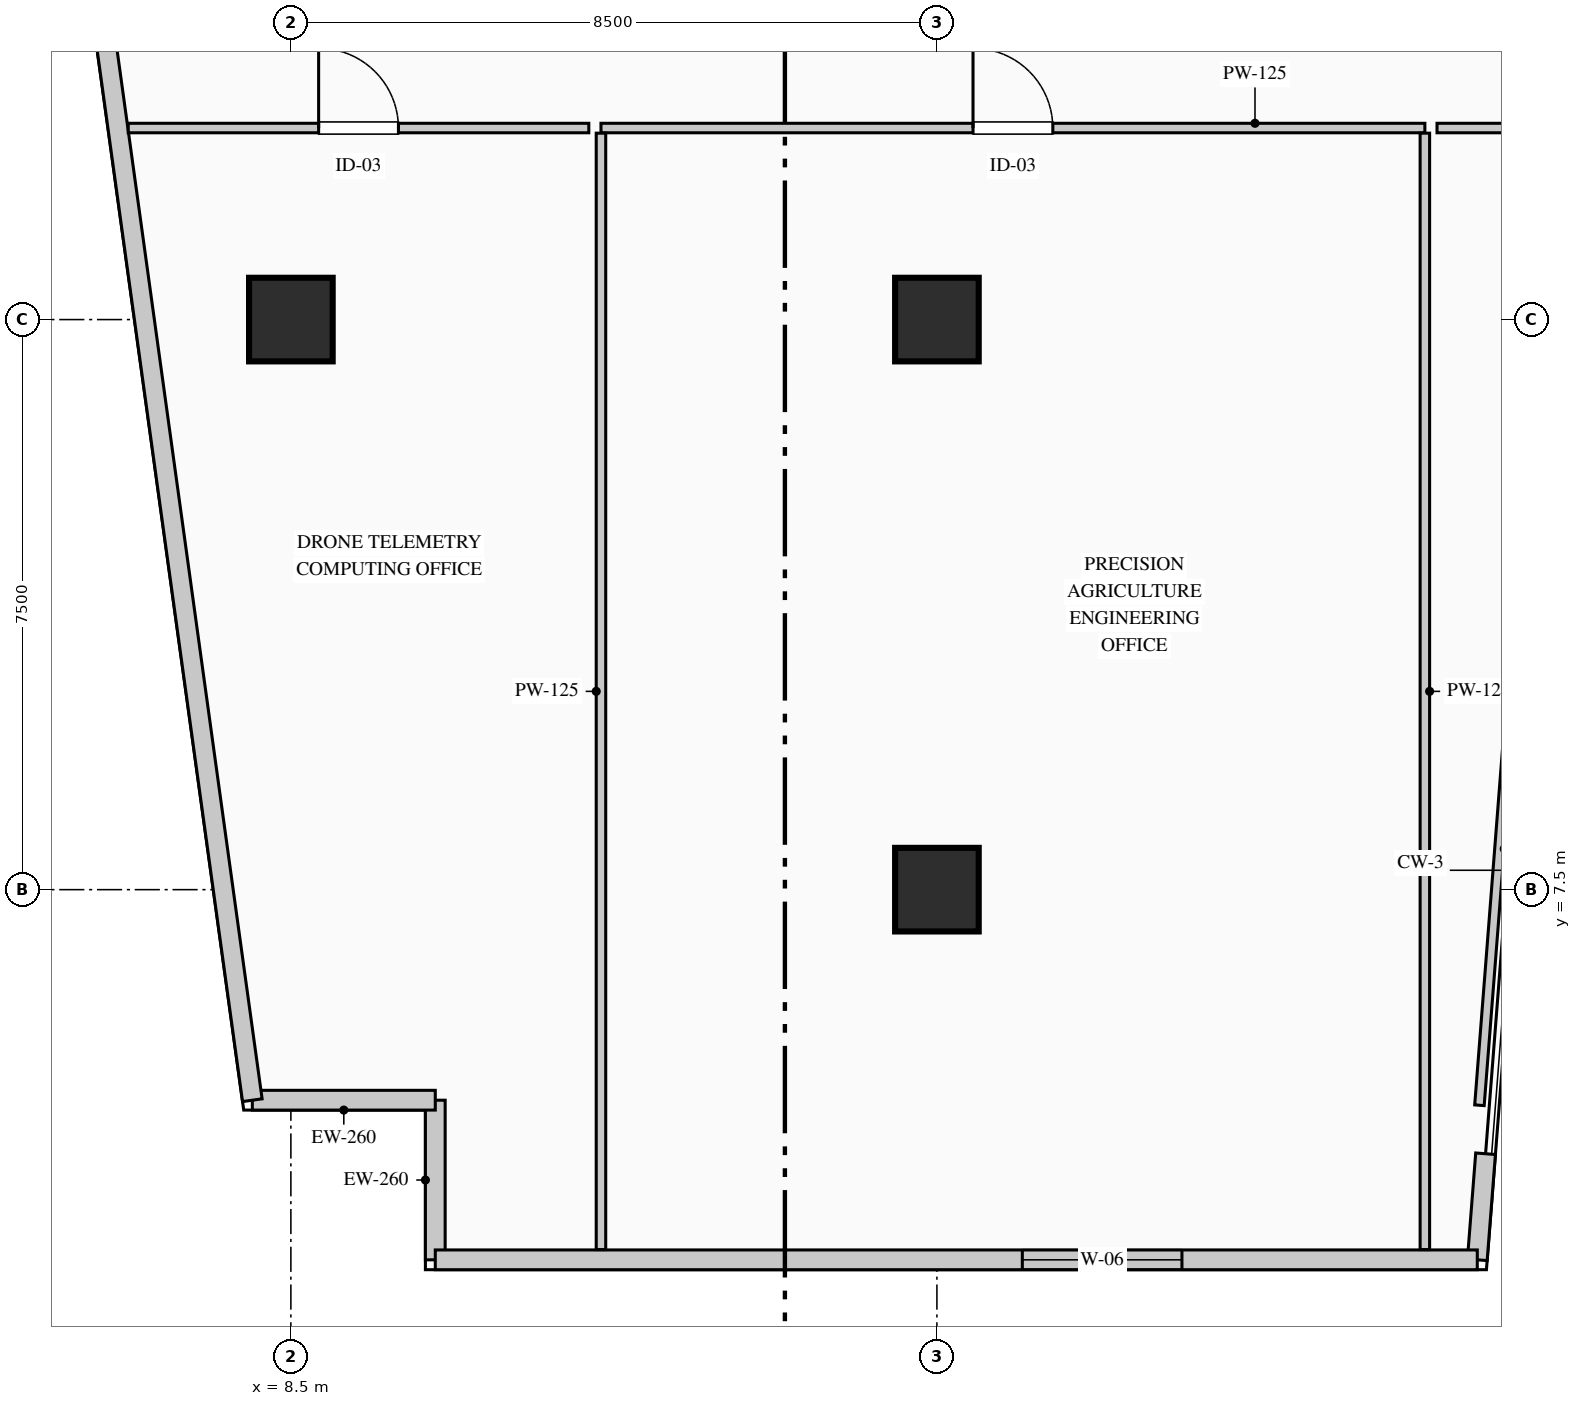
"""IFC4 building model, lengths in metres.
Left out: names, types, materials, properties, quantities, classifications, styles, units other than length and angle.
Written with IfcOpenShell. Run it as: python <this file> out.ifc"""

import sys

from ifc_helpers import new_model, si_unit, direction, frame, frame_2d, origin, origin_2d, place, context, subcontext, project, spatial, rectangle, extrude, element, fill, save


model = new_model("IFC4")
c1 = context("Model", 3, precision=1e-05, world=origin(), true_north=direction((0.0, 1.0)))
c2 = subcontext(c1, "Body", "Model", "MODEL_VIEW")
j1 = project(units=[si_unit("LENGTHUNIT", "METRE"), si_unit("PLANEANGLEUNIT", "RADIAN")], contexts=[c1])
p1 = place(None, origin())
s1 = spatial("IfcSite", under=j1, at=p1, CompositionType="ELEMENT")
p2 = place(p1, origin())
s2 = spatial("IfcBuilding", under=s1, at=p2, CompositionType="ELEMENT")
p3 = place(p2, frame((0.0, 0.0, 131.15)))
s3 = spatial("IfcBuildingStorey", under=s2, at=p3, CompositionType="ELEMENT", Elevation=131.15)
for number, where, z_axis, x_axis in (
    (1, (8.5, 15.0, 0.0), (0.0, 0.0, 1.0), (1.0, 0.0, 0.0)),
    (2, (17.0, 7.5, 0.0), (0.0, 0.0, 1.0), (1.0, 0.0, 0.0)),
    (3, (17.0, 15.0, 0.0), (0.0, 0.0, 1.0), (1.0, 0.0, 0.0)),
):
    element("IfcColumn", number, at=place(p3, frame(where, z_axis=z_axis, x_axis=x_axis)), inside=s3, PredefinedType="COLUMN", context=c2, shape_type="SweptSolid", body=[
        extrude(rectangle(XDim=1.1, YDim=1.1, at=origin_2d()), origin(), (0.0, 0.0, 1.0), 3.95),
    ])
p4 = place(p3, frame((10.4, 2.63, 0.0), z_axis=(0.0, 0.0, 1.0), x_axis=(0.0, 1.0, 0.0)))
e4 = element("IfcWall", 4, at=p4, inside=s3, PredefinedType="STANDARD", context=c2, shape_type="SweptSolid", body=[
    extrude(rectangle(XDim=2.1, YDim=0.26, at=frame_2d((1.05, 0.0))), origin(), (0.0, 0.0, 1.0), 3.69),
])
p5 = place(p3, frame((10.4, 4.73, 0.0), z_axis=(0.0, 0.0, 1.0), x_axis=(-1.0, 0.0, 0.0)))
e5 = element("IfcWall", 5, at=p5, inside=s3, PredefinedType="STANDARD", context=c2, shape_type="SweptSolid", body=[
    extrude(rectangle(XDim=2.407, YDim=0.26, at=frame_2d((1.204, 0.0))), origin(), (0.0, 0.0, 1.0), 3.69),
])
p6 = place(p3, frame((7.993, 4.73, 0.0), z_axis=(0.0, 0.0, 1.0), x_axis=(-0.136989009016, 0.990572567462, 0.0)))
e6 = element("IfcWall", 6, at=p6, inside=s3, PredefinedType="STANDARD", context=c2, shape_type="SweptSolid", body=[
    extrude(rectangle(XDim=36.888, YDim=0.26, at=frame_2d((18.444, 0.0))), origin(), (0.0, 0.0, 1.0), 3.69),
])
p7 = place(p6, frame((19.738, 0.0, 0.9)))
e7 = element("IfcOpeningElement", 7, at=p7, cuts=e6, PredefinedType="OPENING", context=c2, shape_type="SweptSolid", body=[
    extrude(rectangle(XDim=2.1, YDim=2.0, at=frame_2d((1.05, 1.0))), frame((0.0, 0.14, 0.0), z_axis=(0.0, -1.0, 0.0), x_axis=(1.0, 0.0, 0.0)), (0.0, 0.0, 1.0), 0.28),
])
p8 = place(p3, frame((24.219, 4.026, 0.0), z_axis=(0.0, 0.0, 1.0), x_axis=(-0.077776627829, -0.996970810086, 0.0)))
e8 = element("IfcWall", 8, at=p8, inside=s3, PredefinedType="STANDARD", context=c2, shape_type="SweptSolid", body=[
    extrude(rectangle(XDim=1.4, YDim=0.26, at=frame_2d((0.7, 0.0))), origin(), (0.0, 0.0, 1.0), 3.69),
])
p9 = place(p3, frame((24.11, 2.63, 0.0), z_axis=(0.0, 0.0, 1.0), x_axis=(-1.0, 0.0, 0.0)))
e9 = element("IfcWall", 9, at=p9, inside=s3, PredefinedType="STANDARD", context=c2, shape_type="SweptSolid", body=[
    extrude(rectangle(XDim=13.71, YDim=0.26, at=frame_2d((6.855, 0.0))), origin(), (0.0, 0.0, 1.0), 3.69),
])
p10 = place(p9, frame((3.886, 0.0, 0.9)))
e10 = element("IfcOpeningElement", 10, at=p10, cuts=e9, PredefinedType="OPENING", context=c2, shape_type="SweptSolid", body=[
    extrude(rectangle(XDim=2.1, YDim=2.0, at=frame_2d((1.05, 1.0))), frame((0.0, 0.14, 0.0), z_axis=(0.0, -1.0, 0.0), x_axis=(1.0, 0.0, 0.0)), (0.0, 0.0, 1.0), 0.28),
])
p11 = place(p3, frame((12.58, 17.52, 0.0), z_axis=(0.0, 0.0, 1.0), x_axis=(1.0, 0.0, 0.0)))
e11 = element("IfcWall", 11, at=p11, inside=s3, PredefinedType="PARTITIONING", context=c2, shape_type="SweptSolid", body=[
    extrude(rectangle(XDim=10.84, YDim=0.125, at=frame_2d((5.42, 0.0))), origin(), (0.0, 0.0, 1.0), 3.69),
])
p12 = place(p11, frame((4.895, 0.0, 0.0)))
e12 = element("IfcOpeningElement", 12, at=p12, cuts=e11, PredefinedType="OPENING", context=c2, shape_type="SweptSolid", body=[
    extrude(rectangle(XDim=1.05, YDim=2.15, at=frame_2d((0.525, 1.075))), frame((0.0, 0.073, 0.0), z_axis=(0.0, -1.0, 0.0), x_axis=(1.0, 0.0, 0.0)), (0.0, 0.0, 1.0), 0.145),
])
for number, where, z_axis, x_axis in (
    (13, (23.42, 17.452, 0.0), (0.0, 0.0, 1.0), (0.0, -1.0, 0.0)),
    (14, (12.58, 2.765, 0.0), (0.0, 0.0, 1.0), (0.0, 1.0, 0.0)),
):
    element("IfcWall", number, at=place(p3, frame(where, z_axis=z_axis, x_axis=x_axis)), inside=s3, PredefinedType="PARTITIONING", context=c2, shape_type="SweptSolid", body=[
        extrude(rectangle(XDim=14.688, YDim=0.125, at=frame_2d((7.344, 0.0))), origin(), (0.0, 0.0, 1.0), 3.69),
    ])
p13 = place(p3, frame((6.36, 17.52, 0.0), z_axis=(0.0, 0.0, 1.0), x_axis=(1.0, 0.0, 0.0)))
e15 = element("IfcWall", 15, at=p13, inside=s3, PredefinedType="PARTITIONING", context=c2, shape_type="SweptSolid", body=[
    extrude(rectangle(XDim=6.06, YDim=0.125, at=frame_2d((3.03, 0.0))), origin(), (0.0, 0.0, 1.0), 3.69),
])
p14 = place(p13, frame((2.505, 0.0, 0.0)))
e16 = element("IfcOpeningElement", 16, at=p14, cuts=e15, PredefinedType="OPENING", context=c2, shape_type="SweptSolid", body=[
    extrude(rectangle(XDim=1.05, YDim=2.15, at=frame_2d((0.525, 1.075))), frame((0.0, 0.073, 0.0), z_axis=(0.0, -1.0, 0.0), x_axis=(1.0, 0.0, 0.0)), (0.0, 0.0, 1.0), 0.145),
])
p15 = place(p3, frame((24.666, 11.42, 0.0), z_axis=(0.0, 0.0, 1.0), x_axis=(-0.077847945506, -0.996965243818, 0.0)))
e17 = element("IfcWall", 17, at=p15, inside=s3, PredefinedType="PARTITIONING", context=c2, shape_type="SweptSolid", body=[
    extrude(rectangle(XDim=6.777, YDim=0.125, at=frame_2d((3.389, 0.0))), origin(), (0.0, 0.0, 1.0), 3.69),
])
p16 = place(p3, frame((23.58, 17.52, 0.0), z_axis=(0.0, 0.0, 1.0), x_axis=(1.0, 0.0, 0.0)))
e18 = element("IfcWall", 18, at=p16, inside=s3, PredefinedType="PARTITIONING", context=c2, shape_type="SweptSolid", body=[
    extrude(rectangle(XDim=9.84, YDim=0.125, at=frame_2d((4.92, 0.0))), origin(), (0.0, 0.0, 1.0), 3.375),
])
p17 = place(p16, frame((4.395, 0.0, 0.0)))
e19 = element("IfcOpeningElement", 19, at=p17, cuts=e18, PredefinedType="OPENING", context=c2, shape_type="SweptSolid", body=[
    extrude(rectangle(XDim=1.05, YDim=2.15, at=frame_2d((0.525, 1.075))), frame((0.0, 0.073, 0.0), z_axis=(0.0, -1.0, 0.0), x_axis=(1.0, 0.0, 0.0)), (0.0, 0.0, 1.0), 0.145),
])
p18 = place(p10, origin())
e20 = element("IfcWindow", 20, at=p18, inside=s3, PartitioningType="DOUBLE_PANEL_VERTICAL", PredefinedType="WINDOW", context=c2, shape_type="SweptSolid", body=[
    extrude(rectangle(XDim=2.1, YDim=2.0, at=frame_2d((1.05, 1.0))), frame((0.0, 0.03, 0.0), z_axis=(0.0, -1.0, 0.0), x_axis=(1.0, 0.0, 0.0)), (0.0, 0.0, 1.0), 0.06),
])
fill(e10, e20)
p19 = place(p12, origin())
e21 = element("IfcDoor", 21, at=p19, inside=s3, OperationType="SINGLE_SWING_LEFT", PredefinedType="DOOR", context=c2, shape_type="SweptSolid", body=[
    extrude(rectangle(XDim=1.05, YDim=2.15, at=frame_2d((0.525, 1.075))), frame((0.0, 0.025, 0.0), z_axis=(0.0, -1.0, 0.0), x_axis=(1.0, 0.0, 0.0)), (0.0, 0.0, 1.0), 0.05),
])
fill(e12, e21)
p20 = place(p14, origin())
e22 = element("IfcDoor", 22, at=p20, inside=s3, OperationType="SINGLE_SWING_LEFT", PredefinedType="DOOR", context=c2, shape_type="SweptSolid", body=[
    extrude(rectangle(XDim=1.05, YDim=2.15, at=frame_2d((0.525, 1.075))), frame((0.0, 0.025, 0.0), z_axis=(0.0, -1.0, 0.0), x_axis=(1.0, 0.0, 0.0)), (0.0, 0.0, 1.0), 0.05),
])
fill(e16, e22)
save(model, sys.argv[1])
